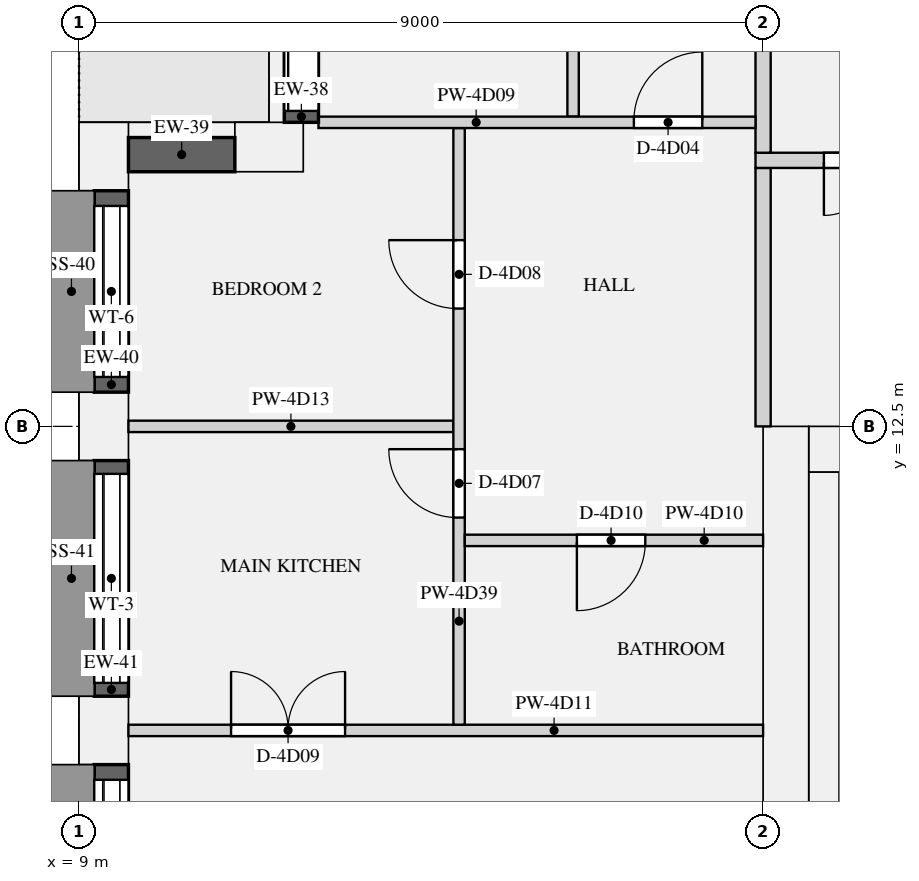
"""IFC4 building model, lengths in metres.
Left out: names, types, materials, properties, quantities, classifications, styles, units other than length and angle.
Written with IfcOpenShell. Run it as: python <this file> out.ifc"""

import sys

from ifc_helpers import new_model, si_unit, direction, frame, frame_2d, origin, origin_2d, place, context, subcontext, project, spatial, rectangle, extrude, element, fill, save


model = new_model("IFC4")
c1 = context("Model", 3, precision=1e-05, world=origin(), true_north=direction((0.0, 1.0)))
c2 = subcontext(c1, "Body", "Model", "MODEL_VIEW")
j1 = project(units=[si_unit("LENGTHUNIT", "METRE"), si_unit("PLANEANGLEUNIT", "RADIAN")], contexts=[c1])
p1 = place(None, origin())
s1 = spatial("IfcSite", under=j1, at=p1, CompositionType="ELEMENT")
p2 = place(p1, origin())
s2 = spatial("IfcBuilding", under=s1, at=p2, CompositionType="ELEMENT")
p3 = place(p2, frame((0.0, 0.0, 223.2)))
s3 = spatial("IfcBuildingStorey", under=s2, at=p3, CompositionType="ELEMENT", Elevation=223.2)
for number, where, z_axis, x_axis in (
    (1, (11.5, 16.175, 0.0), (0.0, 0.0, 1.0), (-1.0, 0.0, 0.0)),
    (2, (9.325, 16.05, 0.0), (0.0, 0.0, 1.0), (0.0, -1.0, 0.0)),
    (3, (9.325, 12.5, 0.0), (0.0, 0.0, 1.0), (0.0, -1.0, 0.0)),
    (4, (9.325, 8.5, 0.0), (0.0, 0.0, 1.0), (0.0, -1.0, 0.0)),
):
    element("IfcColumn", number, at=place(p3, frame(where, z_axis=z_axis, x_axis=x_axis)), inside=s3, PredefinedType="USERDEFINED", context=c2, shape_type="SweptSolid", body=[
        extrude(rectangle(XDim=0.9, YDim=0.65, at=origin_2d()), origin(), (0.0, 0.0, 1.0), 3.15),
    ])
p4 = place(p3, frame((18.3, 0.0, 0.0), z_axis=(0.0, 0.0, 1.0), x_axis=(0.0, 1.0, 0.0)))
e5 = element("IfcWall", 5, at=p4, inside=s3, PredefinedType="SHEAR", context=c2, shape_type="SweptSolid", body=[
    extrude(rectangle(XDim=12.5, YDim=0.6, at=frame_2d((6.25, 0.0))), origin(), (0.0, 0.0, 1.0), 3.15),
])
p5 = place(p3, frame((18.6, 12.2, 0.0), z_axis=(0.0, 0.0, 1.0), x_axis=(1.0, 0.0, 0.0)))
e6 = element("IfcWall", 6, at=p5, inside=s3, PredefinedType="SHEAR", context=c2, shape_type="SweptSolid", body=[
    extrude(rectangle(XDim=34.8, YDim=0.6, at=frame_2d((17.4, 0.0))), origin(), (0.0, 0.0, 1.0), 3.15),
])
p6 = place(p5, frame((24.575, 0.0, 0.0)))
e7 = element("IfcOpeningElement", 7, at=p6, cuts=e6, PredefinedType="OPENING", context=c2, shape_type="SweptSolid", body=[
    extrude(rectangle(XDim=1.1, YDim=2.1, at=frame_2d((0.55, 1.05))), frame((0.0, 0.31, 0.0), z_axis=(0.0, -1.0, 0.0), x_axis=(1.0, 0.0, 0.0)), (0.0, 0.0, 1.0), 0.62),
])
p7 = place(p5, frame((26.825, 0.0, 0.0)))
e8 = element("IfcOpeningElement", 8, at=p7, cuts=e6, PredefinedType="OPENING", context=c2, shape_type="SweptSolid", body=[
    extrude(rectangle(XDim=1.1, YDim=2.1, at=frame_2d((0.55, 1.05))), frame((0.0, 0.31, 0.0), z_axis=(0.0, -1.0, 0.0), x_axis=(1.0, 0.0, 0.0)), (0.0, 0.0, 1.0), 0.62),
])
p8 = place(p5, frame((29.075, 0.0, 0.0)))
e9 = element("IfcOpeningElement", 9, at=p8, cuts=e6, PredefinedType="OPENING", context=c2, shape_type="SweptSolid", body=[
    extrude(rectangle(XDim=1.1, YDim=2.1, at=frame_2d((0.55, 1.05))), frame((0.0, 0.31, 0.0), z_axis=(0.0, -1.0, 0.0), x_axis=(1.0, 0.0, 0.0)), (0.0, 0.0, 1.0), 0.62),
])
p9 = place(p5, frame((11.95, 0.0, 0.0)))
e10 = element("IfcOpeningElement", 10, at=p9, cuts=e6, PredefinedType="OPENING", context=c2, shape_type="SweptSolid", body=[
    extrude(rectangle(XDim=0.9, YDim=2.1, at=frame_2d((0.45, 1.05))), frame((0.0, 0.31, 0.0), z_axis=(0.0, -1.0, 0.0), x_axis=(1.0, 0.0, 0.0)), (0.0, 0.0, 1.0), 0.62),
])
p10 = place(p5, frame((18.45, 0.0, 0.0)))
e11 = element("IfcOpeningElement", 11, at=p10, cuts=e6, PredefinedType="OPENING", context=c2, shape_type="SweptSolid", body=[
    extrude(rectangle(XDim=0.9, YDim=2.1, at=frame_2d((0.45, 1.05))), frame((0.0, 0.31, 0.0), z_axis=(0.0, -1.0, 0.0), x_axis=(1.0, 0.0, 0.0)), (0.0, 0.0, 1.0), 0.62),
])
p11 = place(p5, frame((1.55, 0.0, 0.0)))
e12 = element("IfcOpeningElement", 12, at=p11, cuts=e6, PredefinedType="OPENING", context=c2, shape_type="SweptSolid", body=[
    extrude(rectangle(XDim=1.2, YDim=2.1, at=frame_2d((0.6, 1.05))), frame((0.0, 0.31, 0.0), z_axis=(0.0, -1.0, 0.0), x_axis=(1.0, 0.0, 0.0)), (0.0, 0.0, 1.0), 0.62),
])
p12 = place(p5, frame((32.05, 0.0, 0.0)))
e13 = element("IfcOpeningElement", 13, at=p12, cuts=e6, PredefinedType="OPENING", context=c2, shape_type="SweptSolid", body=[
    extrude(rectangle(XDim=1.2, YDim=2.1, at=frame_2d((0.6, 1.05))), frame((0.0, 0.31, 0.0), z_axis=(0.0, -1.0, 0.0), x_axis=(1.0, 0.0, 0.0)), (0.0, 0.0, 1.0), 0.62),
])
p13 = place(p3, frame((18.8, 1.0, 0.0), z_axis=(0.0, 0.0, 1.0), x_axis=(0.0, 1.0, 0.0)))
e14 = element("IfcWall", 14, at=p13, inside=s3, PredefinedType="SHEAR", context=c2, shape_type="SweptSolid", body=[
    extrude(rectangle(XDim=10.9, YDim=0.4, at=frame_2d((5.45, 0.0))), origin(), (0.0, 0.0, 1.0), 3.15),
])
p14 = place(p3, frame((11.925, 20.05, 0.0), z_axis=(0.0, 0.0, 1.0), x_axis=(0.0, -1.0, 0.0)))
e15 = element("IfcWall", 15, at=p14, inside=s3, PredefinedType="SOLIDWALL", context=c2, shape_type="SweptSolid", body=[
    extrude(rectangle(XDim=3.55, YDim=0.45, at=frame_2d((1.775, 0.0))), origin(), (0.0, 0.0, 1.0), 2.83),
])
p15 = place(p14, frame((0.15, 0.0, 0.0)))
e16 = element("IfcOpeningElement", 16, at=p15, cuts=e15, PredefinedType="OPENING", context=c2, shape_type="SweptSolid", body=[
    extrude(rectangle(XDim=3.25, YDim=2.3, at=frame_2d((1.625, 1.15))), frame((0.0, 0.235, 0.0), z_axis=(0.0, -1.0, 0.0), x_axis=(1.0, 0.0, 0.0)), (0.0, 0.0, 1.0), 0.47),
])
p16 = place(p3, frame((11.05, 16.075, 0.9), z_axis=(0.0, 0.0, 1.0), x_axis=(-1.0, 0.0, 0.0)))
e17 = element("IfcWall", 17, at=p16, inside=s3, PredefinedType="SOLIDWALL", context=c2, shape_type="SweptSolid", body=[
    extrude(rectangle(XDim=1.4, YDim=0.45, at=frame_2d((0.7, 0.0))), origin(), (0.0, 0.0, 1.0), 1.93),
])
p17 = place(p3, frame((9.425, 15.6, 0.9), z_axis=(0.0, 0.0, 1.0), x_axis=(0.0, -1.0, 0.0)))
e18 = element("IfcWall", 18, at=p17, inside=s3, PredefinedType="SOLIDWALL", context=c2, shape_type="SweptSolid", body=[
    extrude(rectangle(XDim=2.65, YDim=0.45, at=frame_2d((1.325, 0.0))), origin(), (0.0, 0.0, 1.0), 1.93),
])
p18 = place(p17, frame((0.2, 0.0, 0.15)))
e19 = element("IfcOpeningElement", 19, at=p18, cuts=e18, PredefinedType="OPENING", context=c2, shape_type="SweptSolid", body=[
    extrude(rectangle(XDim=2.25, YDim=1.5, at=frame_2d((1.125, 0.75))), frame((0.0, 0.235, 0.0), z_axis=(0.0, -1.0, 0.0), x_axis=(1.0, 0.0, 0.0)), (0.0, 0.0, 1.0), 0.47),
])
p19 = place(p3, frame((9.425, 12.05, 0.9), z_axis=(0.0, 0.0, 1.0), x_axis=(0.0, -1.0, 0.0)))
e20 = element("IfcWall", 20, at=p19, inside=s3, PredefinedType="SOLIDWALL", context=c2, shape_type="SweptSolid", body=[
    extrude(rectangle(XDim=3.1, YDim=0.45, at=frame_2d((1.55, 0.0))), origin(), (0.0, 0.0, 1.0), 1.93),
])
p20 = place(p19, frame((0.175, 0.0, 0.15)))
e21 = element("IfcOpeningElement", 21, at=p20, cuts=e20, PredefinedType="OPENING", context=c2, shape_type="SweptSolid", body=[
    extrude(rectangle(XDim=2.75, YDim=1.5, at=frame_2d((1.375, 0.75))), frame((0.0, 0.235, 0.0), z_axis=(0.0, -1.0, 0.0), x_axis=(1.0, 0.0, 0.0)), (0.0, 0.0, 1.0), 0.47),
])
p21 = place(p3, frame((9.425, 8.05, 0.9), z_axis=(0.0, 0.0, 1.0), x_axis=(0.0, -1.0, 0.0)))
e22 = element("IfcWall", 22, at=p21, inside=s3, PredefinedType="SOLIDWALL", context=c2, shape_type="SweptSolid", body=[
    extrude(rectangle(XDim=2.9, YDim=0.45, at=frame_2d((1.45, 0.0))), origin(), (0.0, 0.0, 1.0), 1.93),
])
p22 = place(p21, frame((0.2, 0.0, 0.15)))
e23 = element("IfcOpeningElement", 23, at=p22, cuts=e22, PredefinedType="OPENING", context=c2, shape_type="SweptSolid", body=[
    extrude(rectangle(XDim=2.5, YDim=1.5, at=frame_2d((1.25, 0.75))), frame((0.0, 0.235, 0.0), z_axis=(0.0, -1.0, 0.0), x_axis=(1.0, 0.0, 0.0)), (0.0, 0.0, 1.0), 0.47),
])
p23 = place(p3, frame((18.0, 12.5, 0.0), z_axis=(0.0, 0.0, 1.0), x_axis=(0.0, 1.0, 0.0)))
e24 = element("IfcWall", 24, at=p23, inside=s3, PredefinedType="PARTITIONING", context=c2, shape_type="SweptSolid", body=[
    extrude(rectangle(XDim=3.4, YDim=0.2, at=frame_2d((1.7, 0.0))), origin(), (0.0, 0.0, 1.0), 2.83),
])
p24 = place(p3, frame((12.15, 16.5, 0.0), z_axis=(0.0, 0.0, 1.0), x_axis=(1.0, 0.0, 0.0)))
e25 = element("IfcWall", 25, at=p24, inside=s3, PredefinedType="PARTITIONING", context=c2, shape_type="SweptSolid", body=[
    extrude(rectangle(XDim=5.75, YDim=0.15, at=frame_2d((2.875, 0.0))), origin(), (0.0, 0.0, 1.0), 2.83),
])
p25 = place(p24, frame((4.15, 0.0, 0.0)))
e26 = element("IfcOpeningElement", 26, at=p25, cuts=e25, PredefinedType="OPENING", context=c2, shape_type="SweptSolid", body=[
    extrude(rectangle(XDim=0.9, YDim=2.1, at=frame_2d((0.45, 1.05))), frame((0.0, 0.085, 0.0), z_axis=(0.0, -1.0, 0.0), x_axis=(1.0, 0.0, 0.0)), (0.0, 0.0, 1.0), 0.17),
])
p26 = place(p3, frame((14.075, 11.0, 0.0), z_axis=(0.0, 0.0, 1.0), x_axis=(1.0, 0.0, 0.0)))
e27 = element("IfcWall", 27, at=p26, inside=s3, PredefinedType="PARTITIONING", context=c2, shape_type="SweptSolid", body=[
    extrude(rectangle(XDim=3.925, YDim=0.15, at=frame_2d((1.962, 0.0))), origin(), (0.0, 0.0, 1.0), 2.83),
])
p27 = place(p26, frame((1.475, 0.0, 0.0)))
e28 = element("IfcOpeningElement", 28, at=p27, cuts=e27, PredefinedType="OPENING", context=c2, shape_type="SweptSolid", body=[
    extrude(rectangle(XDim=0.9, YDim=2.1, at=frame_2d((0.45, 1.05))), frame((0.0, 0.085, 0.0), z_axis=(0.0, -1.0, 0.0), x_axis=(1.0, 0.0, 0.0)), (0.0, 0.0, 1.0), 0.17),
])
p28 = place(p3, frame((9.65, 8.5, 0.0), z_axis=(0.0, 0.0, 1.0), x_axis=(1.0, 0.0, 0.0)))
e29 = element("IfcWall", 29, at=p28, inside=s3, PredefinedType="PARTITIONING", context=c2, shape_type="SweptSolid", body=[
    extrude(rectangle(XDim=8.35, YDim=0.15, at=frame_2d((4.175, 0.0))), origin(), (0.0, 0.0, 1.0), 2.83),
])
p29 = place(p28, frame((1.35, 0.0, 0.0)))
e30 = element("IfcOpeningElement", 30, at=p29, cuts=e29, PredefinedType="OPENING", context=c2, shape_type="SweptSolid", body=[
    extrude(rectangle(XDim=1.5, YDim=2.1, at=frame_2d((0.75, 1.05))), frame((0.0, 0.085, 0.0), z_axis=(0.0, -1.0, 0.0), x_axis=(1.0, 0.0, 0.0)), (0.0, 0.0, 1.0), 0.17),
])
p30 = place(p3, frame((9.65, 12.5, 0.0), z_axis=(0.0, 0.0, 1.0), x_axis=(1.0, 0.0, 0.0)))
e31 = element("IfcWall", 31, at=p30, inside=s3, PredefinedType="PARTITIONING", context=c2, shape_type="SweptSolid", body=[
    extrude(rectangle(XDim=4.275, YDim=0.15, at=frame_2d((2.138, 0.0))), origin(), (0.0, 0.0, 1.0), 2.83),
])
p31 = place(p3, frame((17.9, 16.0, 0.0), z_axis=(0.0, 0.0, 1.0), x_axis=(1.0, 0.0, 0.0)))
e32 = element("IfcWall", 32, at=p31, inside=s3, PredefinedType="PARTITIONING", context=c2, shape_type="SweptSolid", body=[
    extrude(rectangle(XDim=36.2, YDim=0.2, at=frame_2d((18.1, 0.0))), origin(), (0.0, 0.0, 1.0), 2.83),
])
p32 = place(p31, frame((0.9, 0.0, 0.0)))
e33 = element("IfcOpeningElement", 33, at=p32, cuts=e32, PredefinedType="OPENING", context=c2, shape_type="SweptSolid", body=[
    extrude(rectangle(XDim=1.4, YDim=2.1, at=frame_2d((0.7, 1.05))), frame((0.0, 0.11, 0.0), z_axis=(0.0, -1.0, 0.0), x_axis=(1.0, 0.0, 0.0)), (0.0, 0.0, 1.0), 0.22),
])
p33 = place(p31, frame((33.9, 0.0, 0.0)))
e34 = element("IfcOpeningElement", 34, at=p33, cuts=e32, PredefinedType="OPENING", context=c2, shape_type="SweptSolid", body=[
    extrude(rectangle(XDim=1.4, YDim=2.1, at=frame_2d((0.7, 1.05))), frame((0.0, 0.11, 0.0), z_axis=(0.0, -1.0, 0.0), x_axis=(1.0, 0.0, 0.0)), (0.0, 0.0, 1.0), 0.22),
])
p34 = place(p3, frame((18.0, 16.1, 0.0), z_axis=(0.0, 0.0, 1.0), x_axis=(0.0, 1.0, 0.0)))
e35 = element("IfcWall", 35, at=p34, inside=s3, PredefinedType="PARTITIONING", context=c2, shape_type="SweptSolid", body=[
    extrude(rectangle(XDim=7.8, YDim=0.2, at=frame_2d((3.9, 0.0))), origin(), (0.0, 0.0, 1.0), 2.83),
])
p35 = place(p34, frame((1.85, 0.0, 0.0)))
e36 = element("IfcOpeningElement", 36, at=p35, cuts=e35, PredefinedType="OPENING", context=c2, shape_type="SweptSolid", body=[
    extrude(rectangle(XDim=1.1, YDim=2.1, at=frame_2d((0.55, 1.05))), frame((0.0, 0.11, 0.0), z_axis=(0.0, -1.0, 0.0), x_axis=(1.0, 0.0, 0.0)), (0.0, 0.0, 1.0), 0.22),
])
p36 = place(p3, frame((15.5, 16.575, 0.0), z_axis=(0.0, 0.0, 1.0), x_axis=(0.0, 1.0, 0.0)))
e37 = element("IfcWall", 37, at=p36, inside=s3, PredefinedType="PARTITIONING", context=c2, shape_type="SweptSolid", body=[
    extrude(rectangle(XDim=6.325, YDim=0.15, at=frame_2d((3.163, 0.0))), origin(), (0.0, 0.0, 1.0), 2.83),
])
p37 = place(p36, frame((1.475, 0.0, 0.0)))
e38 = element("IfcOpeningElement", 38, at=p37, cuts=e37, PredefinedType="OPENING", context=c2, shape_type="SweptSolid", body=[
    extrude(rectangle(XDim=0.9, YDim=2.1, at=frame_2d((0.45, 1.05))), frame((0.0, 0.085, 0.0), z_axis=(0.0, -1.0, 0.0), x_axis=(1.0, 0.0, 0.0)), (0.0, 0.0, 1.0), 0.17),
])
p38 = place(p36, frame((4.725, 0.0, 0.0)))
e39 = element("IfcOpeningElement", 39, at=p38, cuts=e37, PredefinedType="OPENING", context=c2, shape_type="SweptSolid", body=[
    extrude(rectangle(XDim=0.9, YDim=2.1, at=frame_2d((0.45, 1.05))), frame((0.0, 0.085, 0.0), z_axis=(0.0, -1.0, 0.0), x_axis=(1.0, 0.0, 0.0)), (0.0, 0.0, 1.0), 0.17),
])
p39 = place(p3, frame((14.0, 8.575, 0.0), z_axis=(0.0, 0.0, 1.0), x_axis=(0.0, 1.0, 0.0)))
e40 = element("IfcWall", 40, at=p39, inside=s3, PredefinedType="PARTITIONING", context=c2, shape_type="SweptSolid", body=[
    extrude(rectangle(XDim=7.85, YDim=0.15, at=frame_2d((3.925, 0.0))), origin(), (0.0, 0.0, 1.0), 2.83),
])
p40 = place(p39, frame((2.725, 0.0, 0.0)))
e41 = element("IfcOpeningElement", 41, at=p40, cuts=e40, PredefinedType="OPENING", context=c2, shape_type="SweptSolid", body=[
    extrude(rectangle(XDim=0.9, YDim=2.1, at=frame_2d((0.45, 1.05))), frame((0.0, 0.085, 0.0), z_axis=(0.0, -1.0, 0.0), x_axis=(1.0, 0.0, 0.0)), (0.0, 0.0, 1.0), 0.17),
])
p41 = place(p39, frame((5.475, 0.0, 0.0)))
e42 = element("IfcOpeningElement", 42, at=p41, cuts=e40, PredefinedType="OPENING", context=c2, shape_type="SweptSolid", body=[
    extrude(rectangle(XDim=0.9, YDim=2.1, at=frame_2d((0.45, 1.05))), frame((0.0, 0.085, 0.0), z_axis=(0.0, -1.0, 0.0), x_axis=(1.0, 0.0, 0.0)), (0.0, 0.0, 1.0), 0.17),
])
p42 = place(p15, origin())
e43 = element("IfcDoor", 43, at=p42, inside=s3, OperationType="SLIDING_TO_LEFT", PredefinedType="DOOR", context=c2, shape_type="SweptSolid", body=[
    extrude(rectangle(XDim=3.25, YDim=2.3, at=frame_2d((1.625, 1.15))), frame((0.0, -0.07, 0.0), z_axis=(0.0, -1.0, 0.0), x_axis=(1.0, 0.0, 0.0)), (0.0, 0.0, 1.0), 0.05),
])
fill(e16, e43)
p43 = place(p18, origin())
e44 = element("IfcWindow", 44, at=p43, inside=s3, PartitioningType="SINGLE_PANEL", PredefinedType="WINDOW", context=c2, shape_type="SweptSolid", body=[
    extrude(rectangle(XDim=2.25, YDim=1.5, at=frame_2d((1.125, 0.75))), frame((0.0, -0.065, 0.0), z_axis=(0.0, -1.0, 0.0), x_axis=(1.0, 0.0, 0.0)), (0.0, 0.0, 1.0), 0.06),
])
fill(e19, e44)
p44 = place(p20, origin())
e45 = element("IfcWindow", 45, at=p44, inside=s3, PartitioningType="SINGLE_PANEL", PredefinedType="WINDOW", context=c2, shape_type="SweptSolid", body=[
    extrude(rectangle(XDim=2.75, YDim=1.5, at=frame_2d((1.375, 0.75))), frame((0.0, -0.065, 0.0), z_axis=(0.0, -1.0, 0.0), x_axis=(1.0, 0.0, 0.0)), (0.0, 0.0, 1.0), 0.06),
])
fill(e21, e45)
p45 = place(p22, origin())
e46 = element("IfcWindow", 46, at=p45, inside=s3, PartitioningType="SINGLE_PANEL", PredefinedType="WINDOW", context=c2, shape_type="SweptSolid", body=[
    extrude(rectangle(XDim=2.5, YDim=1.5, at=frame_2d((1.25, 0.75))), frame((0.0, -0.065, 0.0), z_axis=(0.0, -1.0, 0.0), x_axis=(1.0, 0.0, 0.0)), (0.0, 0.0, 1.0), 0.06),
])
fill(e23, e46)
p46 = place(p32, frame((1.4, 0.0, 0.0), z_axis=(0.0, 0.0, 1.0), x_axis=(-1.0, 0.0, 0.0)))
e47 = element("IfcDoor", 47, at=p46, inside=s3, OperationType="DOUBLE_DOOR_SINGLE_SWING", PredefinedType="DOOR", context=c2, shape_type="SweptSolid", body=[
    extrude(rectangle(XDim=1.4, YDim=2.1, at=frame_2d((0.7, 1.05))), frame((0.0, 0.025, 0.0), z_axis=(0.0, -1.0, 0.0), x_axis=(1.0, 0.0, 0.0)), (0.0, 0.0, 1.0), 0.05),
])
fill(e33, e47)
p47 = place(p25, origin())
e48 = element("IfcDoor", 48, at=p47, inside=s3, OperationType="SINGLE_SWING_RIGHT", PredefinedType="DOOR", context=c2, shape_type="SweptSolid", body=[
    extrude(rectangle(XDim=0.9, YDim=2.1, at=frame_2d((0.45, 1.05))), frame((0.0, 0.025, 0.0), z_axis=(0.0, -1.0, 0.0), x_axis=(1.0, 0.0, 0.0)), (0.0, 0.0, 1.0), 0.05),
])
fill(e26, e48)
p48 = place(p40, origin())
e49 = element("IfcDoor", 49, at=p48, inside=s3, OperationType="SINGLE_SWING_RIGHT", PredefinedType="DOOR", context=c2, shape_type="SweptSolid", body=[
    extrude(rectangle(XDim=0.9, YDim=2.1, at=frame_2d((0.45, 1.05))), frame((0.0, 0.025, 0.0), z_axis=(0.0, -1.0, 0.0), x_axis=(1.0, 0.0, 0.0)), (0.0, 0.0, 1.0), 0.05),
])
fill(e41, e49)
p49 = place(p41, origin())
e50 = element("IfcDoor", 50, at=p49, inside=s3, OperationType="SINGLE_SWING_RIGHT", PredefinedType="DOOR", context=c2, shape_type="SweptSolid", body=[
    extrude(rectangle(XDim=0.9, YDim=2.1, at=frame_2d((0.45, 1.05))), frame((0.0, 0.025, 0.0), z_axis=(0.0, -1.0, 0.0), x_axis=(1.0, 0.0, 0.0)), (0.0, 0.0, 1.0), 0.05),
])
fill(e42, e50)
p50 = place(p29, origin())
e51 = element("IfcDoor", 51, at=p50, inside=s3, OperationType="DOUBLE_DOOR_SINGLE_SWING", PredefinedType="DOOR", context=c2, shape_type="SweptSolid", body=[
    extrude(rectangle(XDim=1.5, YDim=2.1, at=frame_2d((0.75, 1.05))), frame((0.0, 0.025, 0.0), z_axis=(0.0, -1.0, 0.0), x_axis=(1.0, 0.0, 0.0)), (0.0, 0.0, 1.0), 0.05),
])
fill(e30, e51)
p51 = place(p27, frame((0.9, 0.0, 0.0), z_axis=(0.0, 0.0, 1.0), x_axis=(-1.0, 0.0, 0.0)))
e52 = element("IfcDoor", 52, at=p51, inside=s3, OperationType="SINGLE_SWING_RIGHT", PredefinedType="DOOR", context=c2, shape_type="SweptSolid", body=[
    extrude(rectangle(XDim=0.9, YDim=2.1, at=frame_2d((0.45, 1.05))), frame((0.0, 0.025, 0.0), z_axis=(0.0, -1.0, 0.0), x_axis=(1.0, 0.0, 0.0)), (0.0, 0.0, 1.0), 0.05),
])
fill(e28, e52)
save(model, sys.argv[1])
